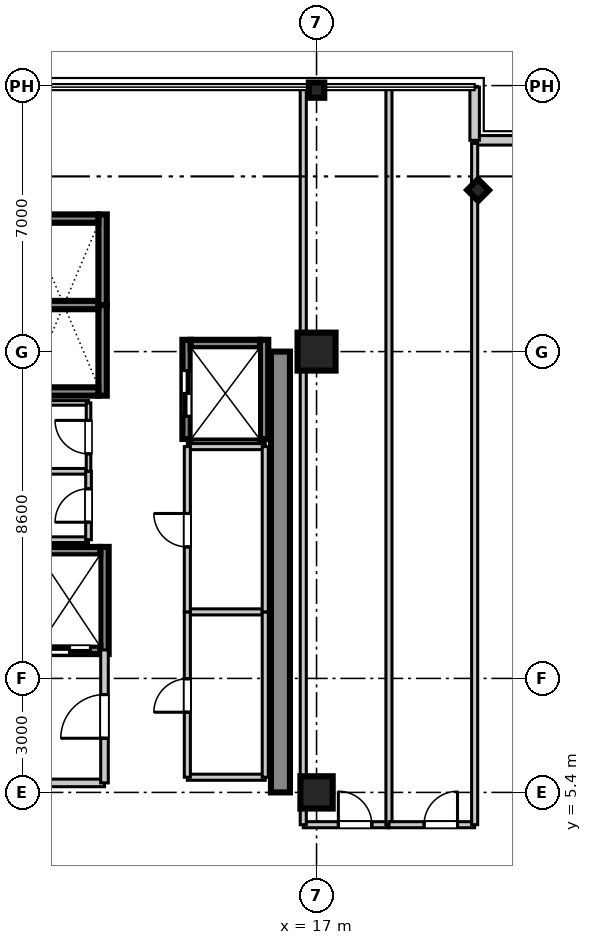
"""IFC4 building model, lengths in metres.
Left out: names, types, materials, properties, quantities, classifications, styles, units other than length and angle.
Written with IfcOpenShell. Run it as: python <this file> out.ifc"""

import sys

from ifc_helpers import new_model, si_unit, direction, frame, frame_2d, origin, origin_2d, place, context, subcontext, project, spatial, rectangle, i_section, extrude, source, transform, mapped, element, fill, save


model = new_model("IFC4")
c1 = context("Model", 3, precision=1e-05, world=origin(), true_north=direction((0.0, 1.0)))
c2 = subcontext(c1, "Body", "Model", "MODEL_VIEW")
j1 = project(units=[si_unit("LENGTHUNIT", "METRE"), si_unit("PLANEANGLEUNIT", "RADIAN")], contexts=[c1])
p1 = place(None, origin())
s1 = spatial("IfcSite", under=j1, at=p1, CompositionType="ELEMENT")
p2 = place(p1, origin())
s2 = spatial("IfcBuilding", under=s1, at=p2, CompositionType="ELEMENT")
p3 = place(p2, frame((0.0, 0.0, 241.9)))
s3 = spatial("IfcBuildingStorey", under=s2, at=p3, CompositionType="ELEMENT", Elevation=241.9)
m1 = source(origin(), c2, "Body", "SweptSolid", [
    extrude(rectangle(XDim=0.85, YDim=0.85, at=origin_2d()), origin(), (0.0, 0.0, 1.0), 3.655),
])
p4 = place(p3, frame((17.0, 5.4, 0.0), z_axis=(0.0, 0.0, 1.0), x_axis=(1.0, 0.0, 0.0)))
e1 = element("IfcColumn", 1, at=p4, inside=s3, PredefinedType="PILASTER", context=c2, shape_type="MappedRepresentation", body=[
    mapped(m1, transform((0.0, 0.0, 0.0), scale=1.0)),
])
m2 = source(origin(), c2, "Body", "SweptSolid", [
    extrude(rectangle(XDim=1.0, YDim=1.0, at=origin_2d()), origin(), (0.0, 0.0, 1.0), 3.655),
])
p5 = place(p3, frame((17.0, 17.0, 0.0), z_axis=(0.0, 0.0, 1.0), x_axis=(1.0, 0.0, 0.0)))
e2 = element("IfcColumn", 2, at=p5, inside=s3, PredefinedType="COLUMN", context=c2, shape_type="MappedRepresentation", body=[
    mapped(m2, transform((0.0, 0.0, 0.0), scale=1.0)),
])
m3 = source(origin(), c2, "Body", "SweptSolid", [
    extrude(i_section(OverallWidth=0.401, OverallDepth=0.406, WebThickness=0.016, FlangeThickness=0.025, at=origin_2d()), origin(), (0.0, 0.0, 1.0), 3.655),
])
for number, where, z_axis, x_axis in (
    (3, (17.0, 23.88, 0.0), (0.0, 0.0, 1.0), (0.0, 1.0, 0.0)),
    (4, (21.25, 21.25, 0.0), (0.0, 0.0, 1.0), (0.707, 0.707, 0.0)),
):
    element("IfcColumn", number, at=place(p3, frame(where, z_axis=z_axis, x_axis=x_axis)), inside=s3, PredefinedType="COLUMN", context=c2, shape_type="MappedRepresentation", body=[
        mapped(m3, transform((0.0, 0.0, 0.0), scale=1.0)),
    ])
m4 = source(origin(), c2, "Body", "SweptSolid", [
    extrude(rectangle(XDim=11.6, YDim=0.5, at=frame_2d((5.8, 0.0))), origin(), (0.0, 0.0, 1.0), 3.41),
])
p6 = place(p3, frame((16.05, 5.4, 0.0), z_axis=(0.0, 0.0, 1.0), x_axis=(0.0, 1.0, 0.0)))
e5 = element("IfcWall", 5, at=p6, inside=s3, PredefinedType="SHEAR", context=c2, shape_type="MappedRepresentation", body=[
    mapped(m4, transform((0.0, 0.0, 0.0), scale=1.0)),
])
m5 = source(origin(), c2, "Body", "SweptSolid", [
    extrude(rectangle(XDim=2.385, YDim=0.22, at=frame_2d((1.192, 0.0))), origin(), (0.0, 0.0, 1.0), 3.41),
])
p7 = place(p3, frame((11.37, 15.84, 0.0), z_axis=(0.0, 0.0, 1.0), x_axis=(0.0, 1.0, 0.0)))
e6 = element("IfcWall", 6, at=p7, inside=s3, PredefinedType="SHEAR", context=c2, shape_type="MappedRepresentation", body=[
    mapped(m5, transform((0.0, 0.0, 0.0), scale=1.0)),
])
m6 = source(origin(), c2, "Body", "SweptSolid", [
    extrude(rectangle(XDim=1.82, YDim=0.22, at=frame_2d((0.91, 0.0))), origin(), (0.0, 0.0, 1.0), 3.41),
])
p8 = place(p3, frame((9.44, 15.95, 0.0), z_axis=(0.0, 0.0, 1.0), x_axis=(1.0, 0.0, 0.0)))
e7 = element("IfcWall", 7, at=p8, inside=s3, PredefinedType="SHEAR", context=c2, shape_type="MappedRepresentation", body=[
    mapped(m6, transform((0.0, 0.0, 0.0), scale=1.0)),
])
m7 = source(origin(), c2, "Body", "SweptSolid", [
    extrude(rectangle(XDim=1.82, YDim=0.22, at=frame_2d((0.91, 0.0))), origin(), (0.0, 0.0, 1.0), 3.7),
])
p9 = place(p3, frame((9.44, 18.225, 0.0), z_axis=(0.0, 0.0, 1.0), x_axis=(1.0, 0.0, 0.0)))
e8 = element("IfcWall", 8, at=p9, inside=s3, PredefinedType="SHEAR", context=c2, shape_type="MappedRepresentation", body=[
    mapped(m7, transform((0.0, 0.0, 0.0), scale=1.0)),
])
p10 = place(p3, frame((11.37, 18.225, 0.0), z_axis=(0.0, 0.0, 1.0), x_axis=(0.0, 1.0, 0.0)))
e9 = element("IfcWall", 9, at=p10, inside=s3, PredefinedType="SHEAR", context=c2, shape_type="MappedRepresentation", body=[
    mapped(m5, transform((0.0, 0.0, 0.0), scale=1.0)),
])
p11 = place(p3, frame((9.44, 20.5, 0.0), z_axis=(0.0, 0.0, 1.0), x_axis=(1.0, 0.0, 0.0)))
e10 = element("IfcWall", 10, at=p11, inside=s3, PredefinedType="SHEAR", context=c2, shape_type="MappedRepresentation", body=[
    mapped(m6, transform((0.0, 0.0, 0.0), scale=1.0)),
])
m8 = source(origin(), c2, "Body", "SweptSolid", [
    extrude(rectangle(XDim=2.82, YDim=0.22, at=frame_2d((1.41, 0.0))), origin(), (0.0, 0.0, 1.0), 3.41),
])
p12 = place(p3, frame((11.42, 9.04, 0.0), z_axis=(0.0, 0.0, 1.0), x_axis=(0.0, 1.0, 0.0)))
e11 = element("IfcWall", 11, at=p12, inside=s3, PredefinedType="SHEAR", context=c2, shape_type="MappedRepresentation", body=[
    mapped(m8, transform((0.0, 0.0, 0.0), scale=1.0)),
])
m9 = source(origin(), c2, "Body", "SweptSolid", [
    extrude(rectangle(XDim=1.62, YDim=0.22, at=frame_2d((0.81, 0.0))), origin(), (0.0, 0.0, 1.0), 3.41),
])
p13 = place(p3, frame((9.69, 9.15, 0.0), z_axis=(0.0, 0.0, 1.0), x_axis=(1.0, 0.0, 0.0)))
e12 = element("IfcWall", 12, at=p13, inside=s3, PredefinedType="SHEAR", context=c2, shape_type="MappedRepresentation", body=[
    mapped(m9, transform((0.0, 0.0, 0.0), scale=1.0)),
])
p14 = place(p13, frame((0.26, 0.0, 0.0)))
e13 = element("IfcOpeningElement", 13, at=p14, cuts=e12, PredefinedType="OPENING", context=c2, shape_type="SweptSolid", body=[
    extrude(rectangle(XDim=1.1, YDim=2.2, at=frame_2d((0.55, 1.1))), frame((0.0, 0.12, 0.0), z_axis=(0.0, -1.0, 0.0), x_axis=(1.0, 0.0, 0.0)), (0.0, 0.0, 1.0), 0.24),
])
p15 = place(p3, frame((9.69, 11.75, 0.0), z_axis=(0.0, 0.0, 1.0), x_axis=(1.0, 0.0, 0.0)))
e14 = element("IfcWall", 14, at=p15, inside=s3, PredefinedType="SHEAR", context=c2, shape_type="MappedRepresentation", body=[
    mapped(m9, transform((0.0, 0.0, 0.0), scale=1.0)),
])
m10 = source(origin(), c2, "Body", "SweptSolid", [
    extrude(rectangle(XDim=2.61, YDim=0.22, at=frame_2d((1.305, 0.0))), origin(), (0.0, 0.0, 1.0), 3.41),
])
p16 = place(p3, frame((13.58, 14.7, 0.0), z_axis=(0.0, 0.0, 1.0), x_axis=(0.0, 1.0, 0.0)))
e15 = element("IfcWall", 15, at=p16, inside=s3, PredefinedType="SHEAR", context=c2, shape_type="MappedRepresentation", body=[
    mapped(m10, transform((0.0, 0.0, 0.0), scale=1.0)),
])
p17 = place(p16, frame((0.6, 0.0, 0.0)))
e16 = element("IfcOpeningElement", 16, at=p17, cuts=e15, PredefinedType="OPENING", context=c2, shape_type="SweptSolid", body=[
    extrude(rectangle(XDim=1.2, YDim=2.2, at=frame_2d((0.6, 1.1))), frame((0.0, 0.12, 0.0), z_axis=(0.0, -1.0, 0.0), x_axis=(1.0, 0.0, 0.0)), (0.0, 0.0, 1.0), 0.24),
])
p18 = place(p3, frame((15.62, 14.7, 0.0), z_axis=(0.0, 0.0, 1.0), x_axis=(0.0, 1.0, 0.0)))
e17 = element("IfcWall", 17, at=p18, inside=s3, PredefinedType="SHEAR", context=c2, shape_type="MappedRepresentation", body=[
    mapped(m10, transform((0.0, 0.0, 0.0), scale=1.0)),
])
p19 = place(p3, frame((13.69, 17.2, 0.0), z_axis=(0.0, 0.0, 1.0), x_axis=(1.0, 0.0, 0.0)))
e18 = element("IfcWall", 18, at=p19, inside=s3, PredefinedType="SHEAR", context=c2, shape_type="MappedRepresentation", body=[
    mapped(m6, transform((0.0, 0.0, 0.0), scale=1.0)),
])
m11 = source(origin(), c2, "Body", "SweptSolid", [
    extrude(rectangle(XDim=1.4, YDim=0.25, at=frame_2d((0.7, 0.0))), origin(), (0.0, 0.0, 1.0), 3.41),
])
p20 = place(p3, frame((21.16, 22.56, 0.0), z_axis=(0.0, 0.0, 1.0), x_axis=(1.0, 0.0, 0.0)))
e19 = element("IfcWall", 19, at=p20, inside=s3, PredefinedType="STANDARD", context=c2, shape_type="MappedRepresentation", body=[
    mapped(m11, transform((0.0, 0.0, 0.0), scale=1.0)),
])
m12 = source(origin(), c2, "Body", "SweptSolid", [
    extrude(rectangle(XDim=1.4, YDim=0.25, at=frame_2d((0.7, 0.0))), origin(), (0.0, 0.0, 1.0), 3.41),
])
p21 = place(p3, frame((21.16, 22.56, 0.0), z_axis=(0.0, 0.0, 1.0), x_axis=(0.0, 1.0, 0.0)))
e20 = element("IfcWall", 20, at=p21, inside=s3, PredefinedType="STANDARD", context=c2, shape_type="MappedRepresentation", body=[
    mapped(m12, transform((0.0, 0.0, 0.0), scale=1.0)),
])
m13 = source(origin(), c2, "Body", "SweptSolid", [
    extrude(rectangle(XDim=3.82, YDim=0.2, at=frame_2d((1.91, 0.0))), origin(), (0.0, 0.0, 1.0), 2.75),
])
p22 = place(p3, frame((7.6, 5.65, 0.0), z_axis=(0.0, 0.0, 1.0), x_axis=(1.0, 0.0, 0.0)))
e21 = element("IfcWall", 21, at=p22, inside=s3, PredefinedType="PARTITIONING", context=c2, shape_type="MappedRepresentation", body=[
    mapped(m13, transform((0.0, 0.0, 0.0), scale=1.0)),
])
m14 = source(origin(), c2, "Body", "SweptSolid", [
    extrude(rectangle(XDim=3.5, YDim=0.2, at=frame_2d((1.75, 0.0))), origin(), (0.0, 0.0, 1.0), 2.75),
])
p23 = place(p3, frame((11.42, 5.65, 0.0), z_axis=(0.0, 0.0, 1.0), x_axis=(0.0, 1.0, 0.0)))
e22 = element("IfcWall", 22, at=p23, inside=s3, PredefinedType="PARTITIONING", context=c2, shape_type="MappedRepresentation", body=[
    mapped(m14, transform((0.0, 0.0, 0.0), scale=1.0)),
])
p24 = place(p23, frame((1.175, 0.0, 0.0)))
e23 = element("IfcOpeningElement", 23, at=p24, cuts=e22, PredefinedType="OPENING", context=c2, shape_type="SweptSolid", body=[
    extrude(rectangle(XDim=1.15, YDim=2.15, at=frame_2d((0.575, 1.075))), frame((0.0, 0.11, 0.0), z_axis=(0.0, -1.0, 0.0), x_axis=(1.0, 0.0, 0.0)), (0.0, 0.0, 1.0), 0.22),
])
m15 = source(origin(), c2, "Body", "SweptSolid", [
    extrude(rectangle(XDim=1.75, YDim=0.15, at=frame_2d((0.875, 0.0))), origin(), (0.0, 0.0, 1.0), 2.75),
])
for number, where, z_axis, x_axis in (
    (24, (9.25, 12.05, 0.0), (0.0, 0.0, 1.0), (1.0, 0.0, 0.0)),
    (25, (9.25, 13.85, 0.0), (0.0, 0.0, 1.0), (1.0, 0.0, 0.0)),
):
    element("IfcWall", number, at=place(p3, frame(where, z_axis=z_axis, x_axis=x_axis)), inside=s3, PredefinedType="PARTITIONING", context=c2, shape_type="MappedRepresentation", body=[
        mapped(m15, transform((0.0, 0.0, 0.0), scale=1.0)),
    ])
m16 = source(origin(), c2, "Body", "SweptSolid", [
    extrude(rectangle(XDim=1.8, YDim=0.15, at=frame_2d((0.9, 0.0))), origin(), (0.0, 0.0, 1.0), 2.75),
])
p25 = place(p3, frame((11.0, 12.05, 0.0), z_axis=(0.0, 0.0, 1.0), x_axis=(0.0, 1.0, 0.0)))
e26 = element("IfcWall", 26, at=p25, inside=s3, PredefinedType="PARTITIONING", context=c2, shape_type="MappedRepresentation", body=[
    mapped(m16, transform((0.0, 0.0, 0.0), scale=1.0)),
])
p26 = place(p25, frame((0.46, 0.0, 0.0)))
e27 = element("IfcOpeningElement", 27, at=p26, cuts=e26, PredefinedType="OPENING", context=c2, shape_type="SweptSolid", body=[
    extrude(rectangle(XDim=0.88, YDim=2.1, at=frame_2d((0.44, 1.05))), frame((0.0, 0.085, 0.0), z_axis=(0.0, -1.0, 0.0), x_axis=(1.0, 0.0, 0.0)), (0.0, 0.0, 1.0), 0.17),
])
m17 = source(origin(), c2, "Body", "SweptSolid", [
    extrude(rectangle(XDim=1.75, YDim=0.12, at=frame_2d((0.875, 0.0))), origin(), (0.0, 0.0, 1.0), 2.75),
])
p27 = place(p3, frame((9.25, 15.65, 0.0), z_axis=(0.0, 0.0, 1.0), x_axis=(1.0, 0.0, 0.0)))
e28 = element("IfcWall", 28, at=p27, inside=s3, PredefinedType="PARTITIONING", context=c2, shape_type="MappedRepresentation", body=[
    mapped(m17, transform((0.0, 0.0, 0.0), scale=1.0)),
])
m18 = source(origin(), c2, "Body", "SweptSolid", [
    extrude(rectangle(XDim=1.8, YDim=0.12, at=frame_2d((0.9, 0.0))), origin(), (0.0, 0.0, 1.0), 2.75),
])
p28 = place(p3, frame((11.0, 13.85, 0.0), z_axis=(0.0, 0.0, 1.0), x_axis=(0.0, 1.0, 0.0)))
e29 = element("IfcWall", 29, at=p28, inside=s3, PredefinedType="PARTITIONING", context=c2, shape_type="MappedRepresentation", body=[
    mapped(m18, transform((0.0, 0.0, 0.0), scale=1.0)),
])
p29 = place(p28, frame((0.46, 0.0, 0.0)))
e30 = element("IfcOpeningElement", 30, at=p29, cuts=e29, PredefinedType="OPENING", context=c2, shape_type="SweptSolid", body=[
    extrude(rectangle(XDim=0.88, YDim=2.1, at=frame_2d((0.44, 1.05))), frame((0.0, 0.07, 0.0), z_axis=(0.0, -1.0, 0.0), x_axis=(1.0, 0.0, 0.0)), (0.0, 0.0, 1.0), 0.14),
])
m19 = source(origin(), c2, "Body", "SweptSolid", [
    extrude(rectangle(XDim=2.05, YDim=0.16, at=frame_2d((1.025, 0.0))), origin(), (0.0, 0.0, 1.0), 2.75),
])
for number, where, z_axis, x_axis in (
    (31, (13.6, 5.8, 0.0), (0.0, 0.0, 1.0), (1.0, 0.0, 0.0)),
    (32, (13.6, 10.15, 0.0), (0.0, 0.0, 1.0), (1.0, 0.0, 0.0)),
):
    element("IfcWall", number, at=place(p3, frame(where, z_axis=z_axis, x_axis=x_axis)), inside=s3, PredefinedType="PARTITIONING", context=c2, shape_type="MappedRepresentation", body=[
        mapped(m19, transform((0.0, 0.0, 0.0), scale=1.0)),
    ])
m20 = source(origin(), c2, "Body", "SweptSolid", [
    extrude(rectangle(XDim=4.35, YDim=0.16, at=frame_2d((2.175, 0.0))), origin(), (0.0, 0.0, 1.0), 2.75),
])
p30 = place(p3, frame((13.6, 5.8, 0.0), z_axis=(0.0, 0.0, 1.0), x_axis=(0.0, 1.0, 0.0)))
e33 = element("IfcWall", 33, at=p30, inside=s3, PredefinedType="PARTITIONING", context=c2, shape_type="MappedRepresentation", body=[
    mapped(m20, transform((0.0, 0.0, 0.0), scale=1.0)),
])
p31 = place(p30, frame((1.71, 0.0, 0.0)))
e34 = element("IfcOpeningElement", 34, at=p31, cuts=e33, PredefinedType="OPENING", context=c2, shape_type="SweptSolid", body=[
    extrude(rectangle(XDim=0.88, YDim=2.1, at=frame_2d((0.44, 1.05))), frame((0.0, 0.09, 0.0), z_axis=(0.0, -1.0, 0.0), x_axis=(1.0, 0.0, 0.0)), (0.0, 0.0, 1.0), 0.18),
])
p32 = place(p3, frame((15.65, 5.8, 0.0), z_axis=(0.0, 0.0, 1.0), x_axis=(0.0, 1.0, 0.0)))
e35 = element("IfcWall", 35, at=p32, inside=s3, PredefinedType="PARTITIONING", context=c2, shape_type="MappedRepresentation", body=[
    mapped(m20, transform((0.0, 0.0, 0.0), scale=1.0)),
])
p33 = place(p3, frame((13.6, 14.5, 0.0), z_axis=(0.0, 0.0, 1.0), x_axis=(1.0, 0.0, 0.0)))
e36 = element("IfcWall", 36, at=p33, inside=s3, PredefinedType="PARTITIONING", context=c2, shape_type="MappedRepresentation", body=[
    mapped(m19, transform((0.0, 0.0, 0.0), scale=1.0)),
])
m21 = source(origin(), c2, "Body", "SweptSolid", [
    extrude(rectangle(XDim=4.35, YDim=0.16, at=frame_2d((2.175, 0.0))), origin(), (0.0, 0.0, 1.0), 2.75),
])
p34 = place(p3, frame((13.6, 10.15, 0.0), z_axis=(0.0, 0.0, 1.0), x_axis=(0.0, 1.0, 0.0)))
e37 = element("IfcWall", 37, at=p34, inside=s3, PredefinedType="PARTITIONING", context=c2, shape_type="MappedRepresentation", body=[
    mapped(m21, transform((0.0, 0.0, 0.0), scale=1.0)),
])
p35 = place(p34, frame((1.71, 0.0, 0.0)))
e38 = element("IfcOpeningElement", 38, at=p35, cuts=e37, PredefinedType="OPENING", context=c2, shape_type="SweptSolid", body=[
    extrude(rectangle(XDim=0.88, YDim=2.1, at=frame_2d((0.44, 1.05))), frame((0.0, 0.09, 0.0), z_axis=(0.0, -1.0, 0.0), x_axis=(1.0, 0.0, 0.0)), (0.0, 0.0, 1.0), 0.18),
])
p36 = place(p3, frame((15.65, 10.15, 0.0), z_axis=(0.0, 0.0, 1.0), x_axis=(0.0, 1.0, 0.0)))
e39 = element("IfcWall", 39, at=p36, inside=s3, PredefinedType="PARTITIONING", context=c2, shape_type="MappedRepresentation", body=[
    mapped(m21, transform((0.0, 0.0, 0.0), scale=1.0)),
])
m22 = source(origin(), c2, "Body", "SweptSolid", [
    extrude(rectangle(XDim=2.255, YDim=0.16, at=frame_2d((1.127, 0.0))), origin(), (0.0, 0.0, 1.0), 2.75),
])
p37 = place(p3, frame((16.65, 4.55, 0.0), z_axis=(0.0, 0.0, 1.0), x_axis=(1.0, 0.0, 0.0)))
e40 = element("IfcWall", 40, at=p37, inside=s3, PredefinedType="PARTITIONING", context=c2, shape_type="MappedRepresentation", body=[
    mapped(m22, transform((0.0, 0.0, 0.0), scale=1.0)),
])
p38 = place(p37, frame((0.924, 0.0, 0.0)))
e41 = element("IfcOpeningElement", 41, at=p38, cuts=e40, PredefinedType="OPENING", context=c2, shape_type="SweptSolid", body=[
    extrude(rectangle(XDim=0.88, YDim=2.1, at=frame_2d((0.44, 1.05))), frame((0.0, 0.09, 0.0), z_axis=(0.0, -1.0, 0.0), x_axis=(1.0, 0.0, 0.0)), (0.0, 0.0, 1.0), 0.18),
])
m23 = source(origin(), c2, "Body", "SweptSolid", [
    extrude(rectangle(XDim=19.35, YDim=0.16, at=frame_2d((9.675, 0.0))), origin(), (0.0, 0.0, 1.0), 2.75),
])
for number, where, z_axis, x_axis in (
    (42, (16.65, 4.55, 0.0), (0.0, 0.0, 1.0), (0.0, 1.0, 0.0)),
    (43, (18.905, 4.55, 0.0), (0.0, 0.0, 1.0), (0.0, 1.0, 0.0)),
):
    element("IfcWall", number, at=place(p3, frame(where, z_axis=z_axis, x_axis=x_axis)), inside=s3, PredefinedType="PARTITIONING", context=c2, shape_type="MappedRepresentation", body=[
        mapped(m23, transform((0.0, 0.0, 0.0), scale=1.0)),
    ])
m24 = source(origin(), c2, "Body", "SweptSolid", [
    extrude(rectangle(XDim=2.255, YDim=0.16, at=frame_2d((1.127, 0.0))), origin(), (0.0, 0.0, 1.0), 2.75),
])
p39 = place(p3, frame((18.905, 4.55, 0.0), z_axis=(0.0, 0.0, 1.0), x_axis=(1.0, 0.0, 0.0)))
e44 = element("IfcWall", 44, at=p39, inside=s3, PredefinedType="PARTITIONING", context=c2, shape_type="MappedRepresentation", body=[
    mapped(m24, transform((0.0, 0.0, 0.0), scale=1.0)),
])
p40 = place(p39, frame((0.924, 0.0, 0.0)))
e45 = element("IfcOpeningElement", 45, at=p40, cuts=e44, PredefinedType="OPENING", context=c2, shape_type="SweptSolid", body=[
    extrude(rectangle(XDim=0.88, YDim=2.1, at=frame_2d((0.44, 1.05))), frame((0.0, 0.09, 0.0), z_axis=(0.0, -1.0, 0.0), x_axis=(1.0, 0.0, 0.0)), (0.0, 0.0, 1.0), 0.18),
])
m25 = source(origin(), c2, "Body", "SweptSolid", [
    extrude(rectangle(XDim=17.93, YDim=0.16, at=frame_2d((8.965, 0.0))), origin(), (0.0, 0.0, 1.0), 2.75),
])
p41 = place(p3, frame((21.16, 4.55, 0.0), z_axis=(0.0, 0.0, 1.0), x_axis=(0.0, 1.0, 0.0)))
e46 = element("IfcWall", 46, at=p41, inside=s3, PredefinedType="PARTITIONING", context=c2, shape_type="MappedRepresentation", body=[
    mapped(m25, transform((0.0, 0.0, 0.0), scale=1.0)),
])
m26 = source(origin(), c2, "Body", "SweptSolid", [
    extrude(rectangle(XDim=1.1, YDim=2.2, at=frame_2d((0.55, 1.1))), frame((0.0, 0.025, 0.0), z_axis=(0.0, -1.0, 0.0), x_axis=(1.0, 0.0, 0.0)), (0.0, 0.0, 1.0), 0.05),
])
p42 = place(p14, frame((1.1, 0.0, 0.0), z_axis=(0.0, 0.0, 1.0), x_axis=(-1.0, 0.0, 0.0)))
e47 = element("IfcDoor", 47, at=p42, inside=s3, OperationType="DOUBLE_DOOR_SLIDING", PredefinedType="DOOR", context=c2, shape_type="MappedRepresentation", body=[
    mapped(m26, transform((0.0, 0.0, 0.0), scale=1.0)),
])
fill(e13, e47)
m27 = source(origin(), c2, "Body", "SweptSolid", [
    extrude(rectangle(XDim=1.2, YDim=2.2, at=frame_2d((0.6, 1.1))), frame((0.0, 0.025, 0.0), z_axis=(0.0, -1.0, 0.0), x_axis=(1.0, 0.0, 0.0)), (0.0, 0.0, 1.0), 0.05),
])
p43 = place(p17, origin())
e48 = element("IfcDoor", 48, at=p43, inside=s3, OperationType="DOUBLE_DOOR_SLIDING", PredefinedType="DOOR", context=c2, shape_type="MappedRepresentation", body=[
    mapped(m27, transform((0.0, 0.0, 0.0), scale=1.0)),
])
fill(e16, e48)
m28 = source(origin(), c2, "Body", "SweptSolid", [
    extrude(rectangle(XDim=1.15, YDim=2.15, at=frame_2d((0.575, 1.075))), frame((0.0, 0.025, 0.0), z_axis=(0.0, -1.0, 0.0), x_axis=(1.0, 0.0, 0.0)), (0.0, 0.0, 1.0), 0.05),
])
p44 = place(p24, frame((1.15, 0.0, 0.0), z_axis=(0.0, 0.0, 1.0), x_axis=(-1.0, 0.0, 0.0)))
e49 = element("IfcDoor", 49, at=p44, inside=s3, OperationType="SINGLE_SWING_LEFT", PredefinedType="DOOR", context=c2, shape_type="MappedRepresentation", body=[
    mapped(m28, transform((0.0, 0.0, 0.0), scale=1.0)),
])
fill(e23, e49)
m29 = source(origin(), c2, "Body", "SweptSolid", [
    extrude(rectangle(XDim=0.88, YDim=2.1, at=frame_2d((0.44, 1.05))), frame((0.0, 0.025, 0.0), z_axis=(0.0, -1.0, 0.0), x_axis=(1.0, 0.0, 0.0)), (0.0, 0.0, 1.0), 0.05),
])
p45 = place(p26, origin())
e50 = element("IfcDoor", 50, at=p45, inside=s3, OperationType="SINGLE_SWING_LEFT", PredefinedType="DOOR", context=c2, shape_type="MappedRepresentation", body=[
    mapped(m29, transform((0.0, 0.0, 0.0), scale=1.0)),
])
fill(e27, e50)
p46 = place(p29, origin())
e51 = element("IfcDoor", 51, at=p46, inside=s3, OperationType="SINGLE_SWING_RIGHT", PredefinedType="DOOR", context=c2, shape_type="MappedRepresentation", body=[
    mapped(m29, transform((0.0, 0.0, 0.0), scale=1.0)),
])
fill(e30, e51)
p47 = place(p31, frame((0.88, 0.0, 0.0), z_axis=(0.0, 0.0, 1.0), x_axis=(-1.0, 0.0, 0.0)))
e52 = element("IfcDoor", 52, at=p47, inside=s3, OperationType="SINGLE_SWING_LEFT", PredefinedType="DOOR", context=c2, shape_type="MappedRepresentation", body=[
    mapped(m29, transform((0.0, 0.0, 0.0), scale=1.0)),
])
fill(e34, e52)
p48 = place(p35, frame((0.88, 0.0, 0.0), z_axis=(0.0, 0.0, 1.0), x_axis=(-1.0, 0.0, 0.0)))
e53 = element("IfcDoor", 53, at=p48, inside=s3, OperationType="SINGLE_SWING_RIGHT", PredefinedType="DOOR", context=c2, shape_type="MappedRepresentation", body=[
    mapped(m29, transform((0.0, 0.0, 0.0), scale=1.0)),
])
fill(e38, e53)
p49 = place(p38, origin())
e54 = element("IfcDoor", 54, at=p49, inside=s3, OperationType="SINGLE_SWING_LEFT", PredefinedType="DOOR", context=c2, shape_type="MappedRepresentation", body=[
    mapped(m29, transform((0.0, 0.0, 0.0), scale=1.0)),
])
fill(e41, e54)
p50 = place(p40, origin())
e55 = element("IfcDoor", 55, at=p50, inside=s3, OperationType="SINGLE_SWING_RIGHT", PredefinedType="DOOR", context=c2, shape_type="MappedRepresentation", body=[
    mapped(m29, transform((0.0, 0.0, 0.0), scale=1.0)),
])
fill(e45, e55)
save(model, sys.argv[1])
